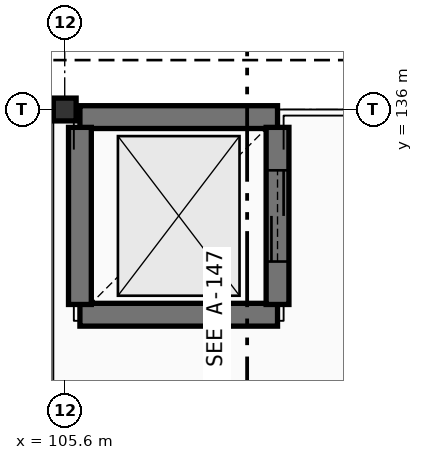
"""IFC4 building model, lengths in metres.
Left out: names, types, materials, properties, quantities, classifications, styles, units other than length and angle.
Written with IfcOpenShell. Run it as: python <this file> out.ifc"""

import sys

from ifc_helpers import new_model, si_unit, direction, frame, frame_2d, origin, origin_2d, place, context, subcontext, project, spatial, rectangle, i_section, extrude, element, fill, save


model = new_model("IFC4")
c1 = context("Model", 3, precision=1e-05, world=origin(), true_north=direction((0.0, 1.0)))
c2 = subcontext(c1, "Body", "Model", "MODEL_VIEW")
j1 = project(units=[si_unit("LENGTHUNIT", "METRE"), si_unit("PLANEANGLEUNIT", "RADIAN")], contexts=[c1])
p1 = place(None, origin())
s1 = spatial("IfcSite", under=j1, at=p1, CompositionType="ELEMENT")
p2 = place(p1, origin())
s2 = spatial("IfcBuilding", under=s1, at=p2, CompositionType="ELEMENT")
p3 = place(p2, frame((0.0, 0.0, 11.4)))
s3 = spatial("IfcBuildingStorey", under=s2, at=p3, CompositionType="ELEMENT", Elevation=11.4)
p4 = place(p3, frame((105.6, 136.0, 0.0), z_axis=(0.0, 0.0, 1.0), x_axis=(1.0, 0.0, 0.0)))
e1 = element("IfcColumn", 1, at=p4, inside=s3, PredefinedType="COLUMN", context=c2, shape_type="SweptSolid", body=[
    extrude(i_section(OverallWidth=0.3, OverallDepth=0.3, WebThickness=0.011, FlangeThickness=0.019, FilletRadius=0.027, at=origin_2d()), origin(), (0.0, 0.0, 1.0), 4.5),
])
for number, where, z_axis, x_axis in (
    (2, (108.4, 135.9, 0.0), (0.0, 0.0, 1.0), (-1.0, 0.0, 0.0)),
    (3, (105.8, 133.3, 0.0), (0.0, 0.0, 1.0), (1.0, 0.0, 0.0)),
):
    element("IfcWall", number, at=place(p3, frame(where, z_axis=z_axis, x_axis=x_axis)), inside=s3, PredefinedType="SHEAR", context=c2, shape_type="SweptSolid", body=[
        extrude(rectangle(XDim=2.6, YDim=0.3, at=frame_2d((1.3, 0.0))), origin(), (0.0, 0.0, 1.0), 4.255),
    ])
p5 = place(p3, frame((108.4, 133.435, 0.0), z_axis=(0.0, 0.0, 1.0), x_axis=(0.0, 1.0, 0.0)))
e4 = element("IfcWall", 4, at=p5, inside=s3, PredefinedType="SHEAR", context=c2, shape_type="SweptSolid", body=[
    extrude(rectangle(XDim=2.33, YDim=0.3, at=frame_2d((1.165, 0.0))), origin(), (0.0, 0.0, 1.0), 4.255),
])
p6 = place(p5, frame((0.565, 0.0, 0.0)))
e5 = element("IfcOpeningElement", 5, at=p6, cuts=e4, PredefinedType="OPENING", context=c2, shape_type="SweptSolid", body=[
    extrude(rectangle(XDim=1.2, YDim=2.2, at=frame_2d((0.6, 1.1))), frame((0.0, 0.16, 0.0), z_axis=(0.0, -1.0, 0.0), x_axis=(1.0, 0.0, 0.0)), (0.0, 0.0, 1.0), 0.32),
])
p7 = place(p3, frame((105.8, 135.765, 0.0), z_axis=(0.0, 0.0, 1.0), x_axis=(0.0, -1.0, 0.0)))
e6 = element("IfcWall", 6, at=p7, inside=s3, PredefinedType="SHEAR", context=c2, shape_type="SweptSolid", body=[
    extrude(rectangle(XDim=2.33, YDim=0.3, at=frame_2d((1.165, 0.0))), origin(), (0.0, 0.0, 1.0), 4.255),
])
p8 = place(p6, origin())
e7 = element("IfcDoor", 7, at=p8, inside=s3, OperationType="DOUBLE_DOOR_SLIDING", PredefinedType="DOOR", context=c2, shape_type="SweptSolid", body=[
    extrude(rectangle(XDim=1.2, YDim=2.2, at=frame_2d((0.6, 1.1))), frame((0.0, 0.025, 0.0), z_axis=(0.0, -1.0, 0.0), x_axis=(1.0, 0.0, 0.0)), (0.0, 0.0, 1.0), 0.05),
])
fill(e5, e7)
save(model, sys.argv[1])
